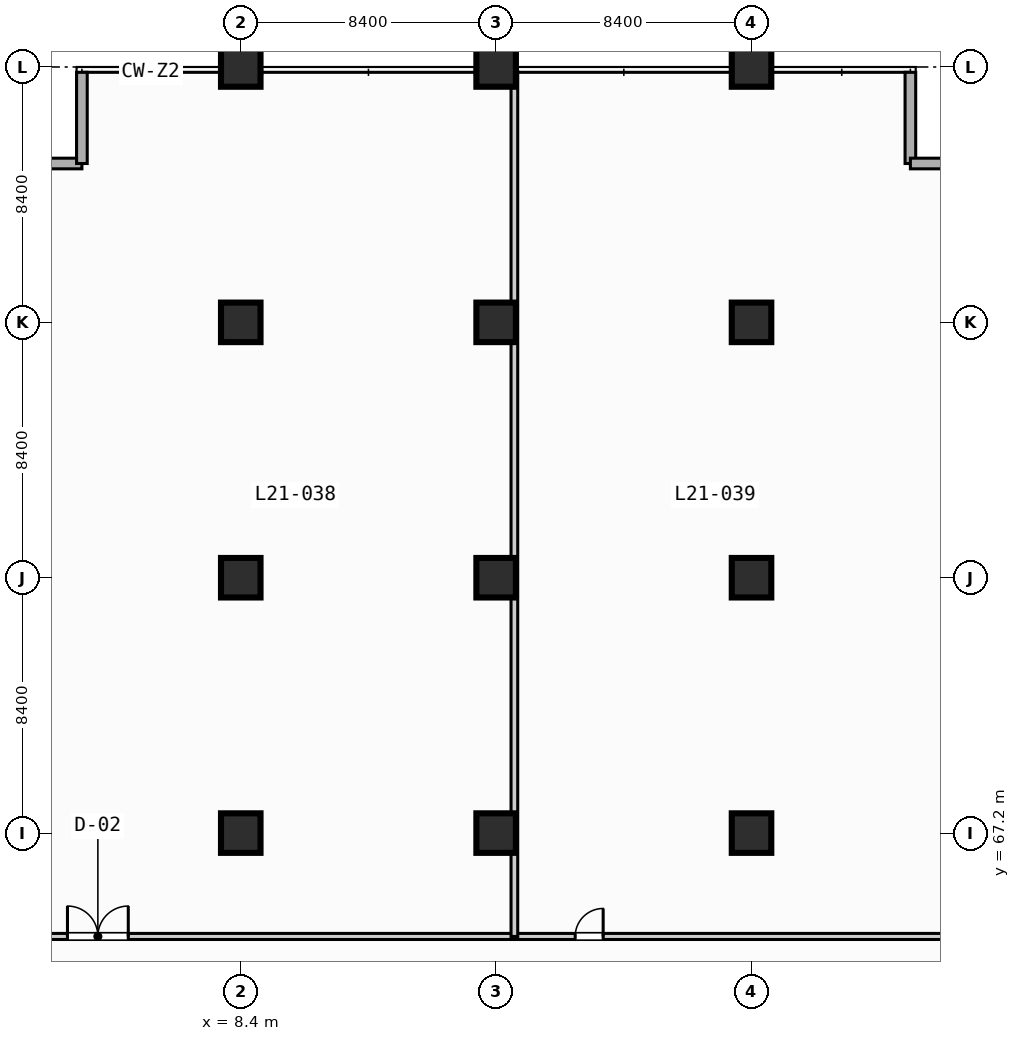
"""IFC4 building model, lengths in metres.
Left out: names, types, materials, properties, quantities, classifications, styles, units other than length and angle.
Written with IfcOpenShell. Run it as: python <this file> out.ifc"""

import sys

from ifc_helpers import new_model, si_unit, direction, frame, frame_2d, origin, origin_2d, place, context, subcontext, project, spatial, rectangle, extrude, element, fill, save


model = new_model("IFC4")
c1 = context("Model", 3, precision=1e-05, world=origin(), true_north=direction((0.0, 1.0)))
c2 = subcontext(c1, "Body", "Model", "MODEL_VIEW")
j1 = project(units=[si_unit("LENGTHUNIT", "METRE"), si_unit("PLANEANGLEUNIT", "RADIAN")], contexts=[c1])
p1 = place(None, origin())
s1 = spatial("IfcSite", under=j1, at=p1, CompositionType="ELEMENT")
p2 = place(p1, origin())
s2 = spatial("IfcBuilding", under=s1, at=p2, CompositionType="ELEMENT")
p3 = place(p2, frame((0.0, 0.0, 89.6)))
s3 = spatial("IfcBuildingStorey", under=s2, at=p3, CompositionType="ELEMENT", Elevation=89.6)
for number, where, z_axis, x_axis in (
    (1, (8.4, 67.2, 0.0), (0.0, 0.0, 1.0), (1.0, 0.0, 0.0)),
    (2, (8.4, 75.6, 0.0), (0.0, 0.0, 1.0), (1.0, 0.0, 0.0)),
    (3, (8.4, 84.0, 0.0), (0.0, 0.0, 1.0), (1.0, 0.0, 0.0)),
    (4, (8.4, 92.4, 0.0), (0.0, 0.0, 1.0), (1.0, 0.0, 0.0)),
    (5, (16.8, 67.2, 0.0), (0.0, 0.0, 1.0), (1.0, 0.0, 0.0)),
    (6, (16.8, 75.6, 0.0), (0.0, 0.0, 1.0), (1.0, 0.0, 0.0)),
    (7, (16.8, 84.0, 0.0), (0.0, 0.0, 1.0), (1.0, 0.0, 0.0)),
    (8, (16.8, 92.4, 0.0), (0.0, 0.0, 1.0), (1.0, 0.0, 0.0)),
    (9, (25.2, 67.2, 0.0), (0.0, 0.0, 1.0), (1.0, 0.0, 0.0)),
    (10, (25.2, 75.6, 0.0), (0.0, 0.0, 1.0), (1.0, 0.0, 0.0)),
    (11, (25.2, 84.0, 0.0), (0.0, 0.0, 1.0), (1.0, 0.0, 0.0)),
    (12, (25.2, 92.4, 0.0), (0.0, 0.0, 1.0), (1.0, 0.0, 0.0)),
):
    element("IfcColumn", number, at=place(p3, frame(where, z_axis=z_axis, x_axis=x_axis)), inside=s3, PredefinedType="COLUMN", context=c2, shape_type="SweptSolid", body=[
        extrude(rectangle(XDim=1.3, YDim=1.3, at=origin_2d()), origin(), (0.0, 0.0, 1.0), 4.4),
    ])
for number, where, z_axis, x_axis in (
    (13, (0.175, 89.225, 0.0), (0.0, 0.0, 1.0), (1.0, 0.0, 0.0)),
    (14, (3.175, 89.225, 0.0), (0.0, 0.0, 1.0), (0.0, 1.0, 0.0)),
    (15, (30.425, 92.225, 0.0), (0.0, 0.0, 1.0), (0.0, -1.0, 0.0)),
    (16, (30.425, 89.225, 0.0), (0.0, 0.0, 1.0), (1.0, 0.0, 0.0)),
):
    element("IfcWall", number, at=place(p3, frame(where, z_axis=z_axis, x_axis=x_axis)), inside=s3, PredefinedType="STANDARD", context=c2, shape_type="SweptSolid", body=[
        extrude(rectangle(XDim=3.0, YDim=0.35, at=frame_2d((1.5, 0.0))), origin(), (0.0, 0.0, 1.0), 4.05),
    ])
p4 = place(p3, frame((0.3, 63.8, 0.0), z_axis=(0.0, 0.0, 1.0), x_axis=(1.0, 0.0, 0.0)))
e17 = element("IfcWall", 17, at=p4, inside=s3, PredefinedType="PARTITIONING", context=c2, shape_type="SweptSolid", body=[
    extrude(rectangle(XDim=33.0, YDim=0.2, at=frame_2d((16.5, 0.0))), origin(), (0.0, 0.0, 1.0), 4.05),
])
p5 = place(p4, frame((2.4, 0.0, 0.0)))
e18 = element("IfcOpeningElement", 18, at=p5, cuts=e17, PredefinedType="OPENING", context=c2, shape_type="SweptSolid", body=[
    extrude(rectangle(XDim=2.0, YDim=2.15, at=frame_2d((1.0, 1.075))), frame((0.0, 0.11, 0.0), z_axis=(0.0, -1.0, 0.0), x_axis=(1.0, 0.0, 0.0)), (0.0, 0.0, 1.0), 0.22),
])
p6 = place(p4, frame((19.1, 0.0, 0.0)))
e19 = element("IfcOpeningElement", 19, at=p6, cuts=e17, PredefinedType="OPENING", context=c2, shape_type="SweptSolid", body=[
    extrude(rectangle(XDim=0.92, YDim=2.1, at=frame_2d((0.46, 1.05))), frame((0.0, 0.11, 0.0), z_axis=(0.0, -1.0, 0.0), x_axis=(1.0, 0.0, 0.0)), (0.0, 0.0, 1.0), 0.22),
])
p7 = place(p3, frame((17.4, 63.8, 0.0), z_axis=(0.0, 0.0, 1.0), x_axis=(0.0, 1.0, 0.0)))
e20 = element("IfcWall", 20, at=p7, inside=s3, PredefinedType="PARTITIONING", context=c2, shape_type="SweptSolid", body=[
    extrude(rectangle(XDim=28.45, YDim=0.22, at=frame_2d((14.225, 0.0))), origin(), (0.0, 0.0, 1.0), 4.05),
])
p8 = place(p5, origin())
e21 = element("IfcDoor", 21, at=p8, inside=s3, OperationType="SINGLE_SWING_LEFT", PredefinedType="DOOR", context=c2, shape_type="SweptSolid", body=[
    extrude(rectangle(XDim=2.0, YDim=2.15, at=frame_2d((1.0, 1.075))), frame((0.0, 0.025, 0.0), z_axis=(0.0, -1.0, 0.0), x_axis=(1.0, 0.0, 0.0)), (0.0, 0.0, 1.0), 0.05),
])
fill(e18, e21)
p9 = place(p6, origin())
e22 = element("IfcDoor", 22, at=p9, inside=s3, OperationType="SINGLE_SWING_RIGHT", PredefinedType="DOOR", context=c2, shape_type="SweptSolid", body=[
    extrude(rectangle(XDim=0.92, YDim=2.1, at=frame_2d((0.46, 1.05))), frame((0.0, 0.025, 0.0), z_axis=(0.0, -1.0, 0.0), x_axis=(1.0, 0.0, 0.0)), (0.0, 0.0, 1.0), 0.05),
])
fill(e19, e22)
save(model, sys.argv[1])
